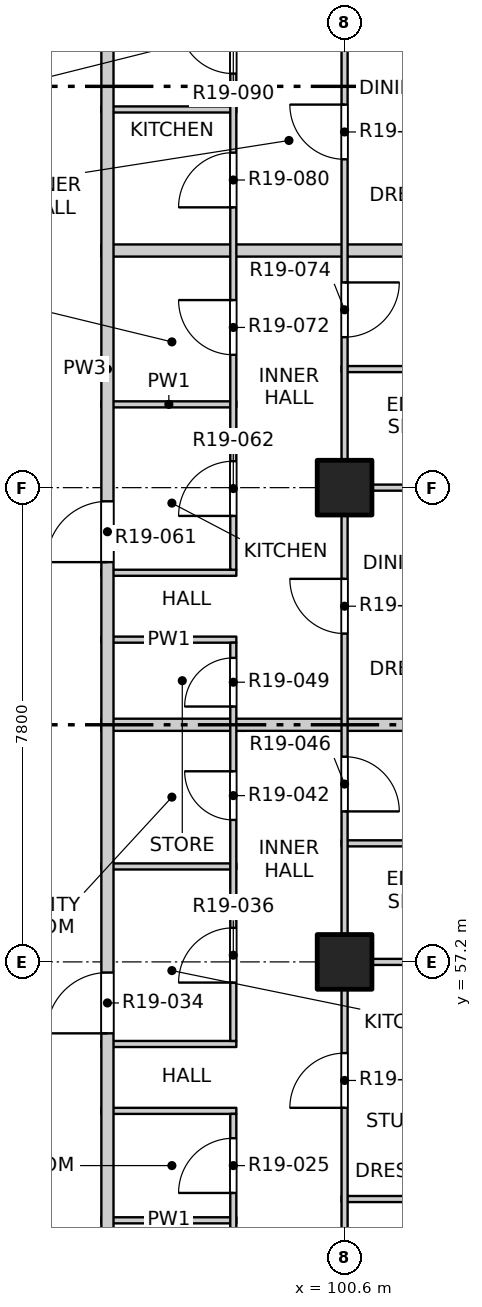
"""IFC4 building model, lengths in metres.
Left out: names, types, materials, properties, quantities, classifications, styles, units other than length and angle.
Written with IfcOpenShell. Run it as: python <this file> out.ifc"""

import sys

from ifc_helpers import new_model, si_unit, direction, frame, frame_2d, origin, origin_2d, place, context, subcontext, project, spatial, rectangle, extrude, element, fill, save


model = new_model("IFC4")
c1 = context("Model", 3, precision=1e-05, world=origin(), true_north=direction((0.0, 1.0)))
c2 = subcontext(c1, "Body", "Model", "MODEL_VIEW")
j1 = project(units=[si_unit("LENGTHUNIT", "METRE"), si_unit("PLANEANGLEUNIT", "RADIAN")], contexts=[c1])
p1 = place(None, origin())
s1 = spatial("IfcSite", under=j1, at=p1, CompositionType="ELEMENT")
p2 = place(p1, origin())
s2 = spatial("IfcBuilding", under=s1, at=p2, CompositionType="ELEMENT")
p3 = place(p2, frame((0.0, 0.0, 197.3)))
s3 = spatial("IfcBuildingStorey", under=s2, at=p3, CompositionType="ELEMENT", Elevation=197.3)
for number, where, z_axis, x_axis in (
    (1, (100.6, 57.2, -0.3), (0.0, 0.0, 1.0), (1.0, 0.0, 0.0)),
    (2, (100.6, 65.0, -0.3), (0.0, 0.0, 1.0), (1.0, 0.0, 0.0)),
):
    element("IfcColumn", number, at=place(p3, frame(where, z_axis=z_axis, x_axis=x_axis)), inside=s3, PredefinedType="COLUMN", context=c2, shape_type="SweptSolid", body=[
        extrude(rectangle(XDim=0.9, YDim=0.9, at=origin_2d()), origin(), (0.0, 0.0, 1.0), 3.45),
    ])
p4 = place(p3, frame((96.6, 52.95, 0.0), z_axis=(0.0, 0.0, 1.0), x_axis=(1.0, 0.0, 0.0)))
e3 = element("IfcWall", 3, at=p4, inside=s3, PredefinedType="PARTITIONING", context=c2, shape_type="SweptSolid", body=[
    extrude(rectangle(XDim=2.22, YDim=0.1, at=frame_2d((1.11, 0.0))), origin(), (0.0, 0.0, 1.0), 3.15),
])
p5 = place(p3, frame((100.55, 53.3, 0.0), z_axis=(0.0, 0.0, 1.0), x_axis=(1.0, 0.0, 0.0)))
e4 = element("IfcWall", 4, at=p5, inside=s3, PredefinedType="PARTITIONING", context=c2, shape_type="SweptSolid", body=[
    extrude(rectangle(XDim=7.55, YDim=0.1, at=frame_2d((3.775, 0.0))), origin(), (0.0, 0.0, 1.0), 3.15),
])
for number, where, z_axis, x_axis in (
    (5, (96.6, 54.75, 0.0), (0.0, 0.0, 1.0), (1.0, 0.0, 0.0)),
    (6, (96.6, 55.85, 0.0), (0.0, 0.0, 1.0), (1.0, 0.0, 0.0)),
):
    element("IfcWall", number, at=place(p3, frame(where, z_axis=z_axis, x_axis=x_axis)), inside=s3, PredefinedType="PARTITIONING", context=c2, shape_type="SweptSolid", body=[
        extrude(rectangle(XDim=2.22, YDim=0.1, at=frame_2d((1.11, 0.0))), origin(), (0.0, 0.0, 1.0), 3.15),
    ])
p6 = place(p3, frame((100.55, 57.2, 0.0), z_axis=(0.0, 0.0, 1.0), x_axis=(1.0, 0.0, 0.0)))
e7 = element("IfcWall", 7, at=p6, inside=s3, PredefinedType="PARTITIONING", context=c2, shape_type="SweptSolid", body=[
    extrude(rectangle(XDim=7.55, YDim=0.1, at=frame_2d((3.775, 0.0))), origin(), (0.0, 0.0, 1.0), 3.15),
])
p7 = place(p3, frame((96.6, 58.77, 0.0), z_axis=(0.0, 0.0, 1.0), x_axis=(1.0, 0.0, 0.0)))
e8 = element("IfcWall", 8, at=p7, inside=s3, PredefinedType="PARTITIONING", context=c2, shape_type="SweptSolid", body=[
    extrude(rectangle(XDim=2.22, YDim=0.1, at=frame_2d((1.11, 0.0))), origin(), (0.0, 0.0, 1.0), 3.15),
])
p8 = place(p3, frame((100.55, 59.15, 0.0), z_axis=(0.0, 0.0, 1.0), x_axis=(1.0, 0.0, 0.0)))
e9 = element("IfcWall", 9, at=p8, inside=s3, PredefinedType="PARTITIONING", context=c2, shape_type="SweptSolid", body=[
    extrude(rectangle(XDim=3.55, YDim=0.1, at=frame_2d((1.775, 0.0))), origin(), (0.0, 0.0, 1.0), 3.15),
])
p9 = place(p3, frame((96.6, 61.1, 0.0), z_axis=(0.0, 0.0, 1.0), x_axis=(1.0, 0.0, 0.0)))
e10 = element("IfcWall", 10, at=p9, inside=s3, PredefinedType="PARTITIONING", context=c2, shape_type="SweptSolid", body=[
    extrude(rectangle(XDim=11.5, YDim=0.2, at=frame_2d((5.75, 0.0))), origin(), (0.0, 0.0, 1.0), 2.55),
])
for number, where, z_axis, x_axis in (
    (11, (96.6, 62.5, 0.0), (0.0, 0.0, 1.0), (1.0, 0.0, 0.0)),
    (12, (96.6, 63.6, 0.0), (0.0, 0.0, 1.0), (1.0, 0.0, 0.0)),
):
    element("IfcWall", number, at=place(p3, frame(where, z_axis=z_axis, x_axis=x_axis)), inside=s3, PredefinedType="PARTITIONING", context=c2, shape_type="SweptSolid", body=[
        extrude(rectangle(XDim=2.22, YDim=0.1, at=frame_2d((1.11, 0.0))), origin(), (0.0, 0.0, 1.0), 3.15),
    ])
p10 = place(p3, frame((100.55, 65.0, 0.0), z_axis=(0.0, 0.0, 1.0), x_axis=(1.0, 0.0, 0.0)))
e13 = element("IfcWall", 13, at=p10, inside=s3, PredefinedType="PARTITIONING", context=c2, shape_type="SweptSolid", body=[
    extrude(rectangle(XDim=7.55, YDim=0.1, at=frame_2d((3.775, 0.0))), origin(), (0.0, 0.0, 1.0), 3.15),
])
p11 = place(p3, frame((96.6, 66.37, 0.0), z_axis=(0.0, 0.0, 1.0), x_axis=(1.0, 0.0, 0.0)))
e14 = element("IfcWall", 14, at=p11, inside=s3, PredefinedType="PARTITIONING", context=c2, shape_type="SweptSolid", body=[
    extrude(rectangle(XDim=2.22, YDim=0.1, at=frame_2d((1.11, 0.0))), origin(), (0.0, 0.0, 1.0), 3.15),
])
p12 = place(p3, frame((100.55, 66.95, 0.0), z_axis=(0.0, 0.0, 1.0), x_axis=(1.0, 0.0, 0.0)))
e15 = element("IfcWall", 15, at=p12, inside=s3, PredefinedType="PARTITIONING", context=c2, shape_type="SweptSolid", body=[
    extrude(rectangle(XDim=3.55, YDim=0.1, at=frame_2d((1.775, 0.0))), origin(), (0.0, 0.0, 1.0), 3.15),
])
p13 = place(p3, frame((96.6, 68.9, 0.0), z_axis=(0.0, 0.0, 1.0), x_axis=(1.0, 0.0, 0.0)))
e16 = element("IfcWall", 16, at=p13, inside=s3, PredefinedType="PARTITIONING", context=c2, shape_type="SweptSolid", body=[
    extrude(rectangle(XDim=11.5, YDim=0.2, at=frame_2d((5.75, 0.0))), origin(), (0.0, 0.0, 1.0), 2.55),
])
p14 = place(p3, frame((96.6, 71.22, 0.0), z_axis=(0.0, 0.0, 1.0), x_axis=(1.0, 0.0, 0.0)))
e17 = element("IfcWall", 17, at=p14, inside=s3, PredefinedType="PARTITIONING", context=c2, shape_type="SweptSolid", body=[
    extrude(rectangle(XDim=2.22, YDim=0.1, at=frame_2d((1.11, 0.0))), origin(), (0.0, 0.0, 1.0), 3.15),
])
p15 = place(p3, frame((96.7, 49.5, 0.0), z_axis=(0.0, 0.0, 1.0), x_axis=(0.0, 1.0, 0.0)))
e18 = element("IfcWall", 18, at=p15, inside=s3, PredefinedType="PARTITIONING", context=c2, shape_type="SweptSolid", body=[
    extrude(rectangle(XDim=34.9, YDim=0.2, at=frame_2d((17.45, 0.0))), origin(), (0.0, 0.0, 1.0), 3.15),
])
p16 = place(p15, frame((6.525, 0.0, 0.0)))
e19 = element("IfcOpeningElement", 19, at=p16, cuts=e18, PredefinedType="OPENING", context=c2, shape_type="SweptSolid", body=[
    extrude(rectangle(XDim=1.0, YDim=2.1, at=frame_2d((0.5, 1.05))), frame((0.0, 0.11, 0.0), z_axis=(0.0, -1.0, 0.0), x_axis=(1.0, 0.0, 0.0)), (0.0, 0.0, 1.0), 0.22),
])
p17 = place(p15, frame((14.275, 0.0, 0.0)))
e20 = element("IfcOpeningElement", 20, at=p17, cuts=e18, PredefinedType="OPENING", context=c2, shape_type="SweptSolid", body=[
    extrude(rectangle(XDim=1.0, YDim=2.1, at=frame_2d((0.5, 1.05))), frame((0.0, 0.11, 0.0), z_axis=(0.0, -1.0, 0.0), x_axis=(1.0, 0.0, 0.0)), (0.0, 0.0, 1.0), 0.22),
])
p18 = place(p15, frame((25.075, 0.0, 0.0)))
e21 = element("IfcOpeningElement", 21, at=p18, cuts=e18, PredefinedType="OPENING", context=c2, shape_type="SweptSolid", body=[
    extrude(rectangle(XDim=1.0, YDim=2.1, at=frame_2d((0.5, 1.05))), frame((0.0, 0.11, 0.0), z_axis=(0.0, -1.0, 0.0), x_axis=(1.0, 0.0, 0.0)), (0.0, 0.0, 1.0), 0.22),
])
p19 = place(p15, frame((30.475, 0.0, 0.0)))
e22 = element("IfcOpeningElement", 22, at=p19, cuts=e18, PredefinedType="OPENING", context=c2, shape_type="SweptSolid", body=[
    extrude(rectangle(XDim=1.0, YDim=2.1, at=frame_2d((0.5, 1.05))), frame((0.0, 0.11, 0.0), z_axis=(0.0, -1.0, 0.0), x_axis=(1.0, 0.0, 0.0)), (0.0, 0.0, 1.0), 0.22),
])
p20 = place(p3, frame((98.77, 45.55, 0.0), z_axis=(0.0, 0.0, 1.0), x_axis=(0.0, 1.0, 0.0)))
e23 = element("IfcWall", 23, at=p20, inside=s3, PredefinedType="PARTITIONING", context=c2, shape_type="SweptSolid", body=[
    extrude(rectangle(XDim=9.15, YDim=0.1, at=frame_2d((4.575, 0.0))), origin(), (0.0, 0.0, 1.0), 3.15),
])
p21 = place(p20, frame((0.85, 0.0, 0.0)))
e24 = element("IfcOpeningElement", 24, at=p21, cuts=e23, PredefinedType="OPENING", context=c2, shape_type="SweptSolid", body=[
    extrude(rectangle(XDim=0.8, YDim=2.1, at=frame_2d((0.4, 1.05))), frame((0.0, 0.06, 0.0), z_axis=(0.0, -1.0, 0.0), x_axis=(1.0, 0.0, 0.0)), (0.0, 0.0, 1.0), 0.12),
])
p22 = place(p20, frame((3.375, 0.0, 0.0)))
e25 = element("IfcOpeningElement", 25, at=p22, cuts=e23, PredefinedType="OPENING", context=c2, shape_type="SweptSolid", body=[
    extrude(rectangle(XDim=0.8, YDim=2.1, at=frame_2d((0.4, 1.05))), frame((0.0, 0.06, 0.0), z_axis=(0.0, -1.0, 0.0), x_axis=(1.0, 0.0, 0.0)), (0.0, 0.0, 1.0), 0.12),
])
p23 = place(p20, frame((5.75, 0.0, 0.0)))
e26 = element("IfcOpeningElement", 26, at=p23, cuts=e23, PredefinedType="OPENING", context=c2, shape_type="SweptSolid", body=[
    extrude(rectangle(XDim=0.9, YDim=2.1, at=frame_2d((0.45, 1.05))), frame((0.0, 0.06, 0.0), z_axis=(0.0, -1.0, 0.0), x_axis=(1.0, 0.0, 0.0)), (0.0, 0.0, 1.0), 0.12),
])
p24 = place(p20, frame((7.85, 0.0, 0.0)))
e27 = element("IfcOpeningElement", 27, at=p24, cuts=e23, PredefinedType="OPENING", context=c2, shape_type="SweptSolid", body=[
    extrude(rectangle(XDim=0.9, YDim=2.1, at=frame_2d((0.45, 1.05))), frame((0.0, 0.06, 0.0), z_axis=(0.0, -1.0, 0.0), x_axis=(1.0, 0.0, 0.0)), (0.0, 0.0, 1.0), 0.12),
])
p25 = place(p3, frame((98.77, 55.9, 0.0), z_axis=(0.0, 0.0, 1.0), x_axis=(0.0, 1.0, 0.0)))
e28 = element("IfcWall", 28, at=p25, inside=s3, PredefinedType="PARTITIONING", context=c2, shape_type="SweptSolid", body=[
    extrude(rectangle(XDim=6.55, YDim=0.1, at=frame_2d((3.275, 0.0))), origin(), (0.0, 0.0, 1.0), 3.15),
])
p26 = place(p25, frame((0.96, 0.0, 0.0)))
e29 = element("IfcOpeningElement", 29, at=p26, cuts=e28, PredefinedType="OPENING", context=c2, shape_type="SweptSolid", body=[
    extrude(rectangle(XDim=0.9, YDim=2.1, at=frame_2d((0.45, 1.05))), frame((0.0, 0.06, 0.0), z_axis=(0.0, -1.0, 0.0), x_axis=(1.0, 0.0, 0.0)), (0.0, 0.0, 1.0), 0.12),
])
p27 = place(p25, frame((3.635, 0.0, 0.0)))
e30 = element("IfcOpeningElement", 30, at=p27, cuts=e28, PredefinedType="OPENING", context=c2, shape_type="SweptSolid", body=[
    extrude(rectangle(XDim=0.8, YDim=2.1, at=frame_2d((0.4, 1.05))), frame((0.0, 0.06, 0.0), z_axis=(0.0, -1.0, 0.0), x_axis=(1.0, 0.0, 0.0)), (0.0, 0.0, 1.0), 0.12),
])
p28 = place(p25, frame((5.5, 0.0, 0.0)))
e31 = element("IfcOpeningElement", 31, at=p28, cuts=e28, PredefinedType="OPENING", context=c2, shape_type="SweptSolid", body=[
    extrude(rectangle(XDim=0.8, YDim=2.1, at=frame_2d((0.4, 1.05))), frame((0.0, 0.06, 0.0), z_axis=(0.0, -1.0, 0.0), x_axis=(1.0, 0.0, 0.0)), (0.0, 0.0, 1.0), 0.12),
])
p29 = place(p3, frame((98.77, 63.65, 0.0), z_axis=(0.0, 0.0, 1.0), x_axis=(0.0, 1.0, 0.0)))
e32 = element("IfcWall", 32, at=p29, inside=s3, PredefinedType="PARTITIONING", context=c2, shape_type="SweptSolid", body=[
    extrude(rectangle(XDim=9.6, YDim=0.1, at=frame_2d((4.8, 0.0))), origin(), (0.0, 0.0, 1.0), 3.15),
])
p30 = place(p29, frame((0.885, 0.0, 0.0)))
e33 = element("IfcOpeningElement", 33, at=p30, cuts=e32, PredefinedType="OPENING", context=c2, shape_type="SweptSolid", body=[
    extrude(rectangle(XDim=0.9, YDim=2.1, at=frame_2d((0.45, 1.05))), frame((0.0, 0.06, 0.0), z_axis=(0.0, -1.0, 0.0), x_axis=(1.0, 0.0, 0.0)), (0.0, 0.0, 1.0), 0.12),
])
p31 = place(p29, frame((3.535, 0.0, 0.0)))
e34 = element("IfcOpeningElement", 34, at=p31, cuts=e32, PredefinedType="OPENING", context=c2, shape_type="SweptSolid", body=[
    extrude(rectangle(XDim=0.9, YDim=2.1, at=frame_2d((0.45, 1.05))), frame((0.0, 0.06, 0.0), z_axis=(0.0, -1.0, 0.0), x_axis=(1.0, 0.0, 0.0)), (0.0, 0.0, 1.0), 0.12),
])
p32 = place(p29, frame((5.96, 0.0, 0.0)))
e35 = element("IfcOpeningElement", 35, at=p32, cuts=e32, PredefinedType="OPENING", context=c2, shape_type="SweptSolid", body=[
    extrude(rectangle(XDim=0.9, YDim=2.1, at=frame_2d((0.45, 1.05))), frame((0.0, 0.06, 0.0), z_axis=(0.0, -1.0, 0.0), x_axis=(1.0, 0.0, 0.0)), (0.0, 0.0, 1.0), 0.12),
])
p33 = place(p29, frame((8.16, 0.0, 0.0)))
e36 = element("IfcOpeningElement", 36, at=p33, cuts=e32, PredefinedType="OPENING", context=c2, shape_type="SweptSolid", body=[
    extrude(rectangle(XDim=0.9, YDim=2.1, at=frame_2d((0.45, 1.05))), frame((0.0, 0.06, 0.0), z_axis=(0.0, -1.0, 0.0), x_axis=(1.0, 0.0, 0.0)), (0.0, 0.0, 1.0), 0.12),
])
p34 = place(p3, frame((100.6, 41.9, 0.0), z_axis=(0.0, 0.0, 1.0), x_axis=(0.0, 1.0, 0.0)))
e37 = element("IfcWall", 37, at=p34, inside=s3, PredefinedType="PARTITIONING", context=c2, shape_type="SweptSolid", body=[
    extrude(rectangle(XDim=46.2, YDim=0.1, at=frame_2d((23.1, 0.0))), origin(), (0.0, 0.0, 1.0), 3.15),
])
p35 = place(p34, frame((1.2, 0.0, 0.0)))
e38 = element("IfcOpeningElement", 38, at=p35, cuts=e37, PredefinedType="OPENING", context=c2, shape_type="SweptSolid", body=[
    extrude(rectangle(XDim=0.9, YDim=2.1, at=frame_2d((0.45, 1.05))), frame((0.0, 0.06, 0.0), z_axis=(0.0, -1.0, 0.0), x_axis=(1.0, 0.0, 0.0)), (0.0, 0.0, 1.0), 0.12),
])
p36 = place(p34, frame((5.1, 0.0, 0.0)))
e39 = element("IfcOpeningElement", 39, at=p36, cuts=e37, PredefinedType="OPENING", context=c2, shape_type="SweptSolid", body=[
    extrude(rectangle(XDim=0.9, YDim=2.1, at=frame_2d((0.45, 1.05))), frame((0.0, 0.06, 0.0), z_axis=(0.0, -1.0, 0.0), x_axis=(1.0, 0.0, 0.0)), (0.0, 0.0, 1.0), 0.12),
])
p37 = place(p34, frame((9.975, 0.0, 0.0)))
e40 = element("IfcOpeningElement", 40, at=p37, cuts=e37, PredefinedType="OPENING", context=c2, shape_type="SweptSolid", body=[
    extrude(rectangle(XDim=0.9, YDim=2.1, at=frame_2d((0.45, 1.05))), frame((0.0, 0.06, 0.0), z_axis=(0.0, -1.0, 0.0), x_axis=(1.0, 0.0, 0.0)), (0.0, 0.0, 1.0), 0.12),
])
p38 = place(p34, frame((12.9, 0.0, 0.0)))
e41 = element("IfcOpeningElement", 41, at=p38, cuts=e37, PredefinedType="OPENING", context=c2, shape_type="SweptSolid", body=[
    extrude(rectangle(XDim=0.9, YDim=2.1, at=frame_2d((0.45, 1.05))), frame((0.0, 0.06, 0.0), z_axis=(0.0, -1.0, 0.0), x_axis=(1.0, 0.0, 0.0)), (0.0, 0.0, 1.0), 0.12),
])
p39 = place(p34, frame((17.775, 0.0, 0.0)))
e42 = element("IfcOpeningElement", 42, at=p39, cuts=e37, PredefinedType="OPENING", context=c2, shape_type="SweptSolid", body=[
    extrude(rectangle(XDim=0.9, YDim=2.1, at=frame_2d((0.45, 1.05))), frame((0.0, 0.06, 0.0), z_axis=(0.0, -1.0, 0.0), x_axis=(1.0, 0.0, 0.0)), (0.0, 0.0, 1.0), 0.12),
])
p40 = place(p34, frame((20.7, 0.0, 0.0)))
e43 = element("IfcOpeningElement", 43, at=p40, cuts=e37, PredefinedType="OPENING", context=c2, shape_type="SweptSolid", body=[
    extrude(rectangle(XDim=0.9, YDim=2.1, at=frame_2d((0.45, 1.05))), frame((0.0, 0.06, 0.0), z_axis=(0.0, -1.0, 0.0), x_axis=(1.0, 0.0, 0.0)), (0.0, 0.0, 1.0), 0.12),
])
p41 = place(p34, frame((25.575, 0.0, 0.0)))
e44 = element("IfcOpeningElement", 44, at=p41, cuts=e37, PredefinedType="OPENING", context=c2, shape_type="SweptSolid", body=[
    extrude(rectangle(XDim=0.9, YDim=2.1, at=frame_2d((0.45, 1.05))), frame((0.0, 0.06, 0.0), z_axis=(0.0, -1.0, 0.0), x_axis=(1.0, 0.0, 0.0)), (0.0, 0.0, 1.0), 0.12),
])
p42 = place(p34, frame((28.5, 0.0, 0.0)))
e45 = element("IfcOpeningElement", 45, at=p42, cuts=e37, PredefinedType="OPENING", context=c2, shape_type="SweptSolid", body=[
    extrude(rectangle(XDim=0.9, YDim=2.1, at=frame_2d((0.45, 1.05))), frame((0.0, 0.06, 0.0), z_axis=(0.0, -1.0, 0.0), x_axis=(1.0, 0.0, 0.0)), (0.0, 0.0, 1.0), 0.12),
])
p43 = place(p34, frame((33.375, 0.0, 0.0)))
e46 = element("IfcOpeningElement", 46, at=p43, cuts=e37, PredefinedType="OPENING", context=c2, shape_type="SweptSolid", body=[
    extrude(rectangle(XDim=0.9, YDim=2.1, at=frame_2d((0.45, 1.05))), frame((0.0, 0.06, 0.0), z_axis=(0.0, -1.0, 0.0), x_axis=(1.0, 0.0, 0.0)), (0.0, 0.0, 1.0), 0.12),
])
p44 = place(p34, frame((37.225, 0.0, 0.0)))
e47 = element("IfcOpeningElement", 47, at=p44, cuts=e37, PredefinedType="OPENING", context=c2, shape_type="SweptSolid", body=[
    extrude(rectangle(XDim=0.9, YDim=2.1, at=frame_2d((0.45, 1.05))), frame((0.0, 0.06, 0.0), z_axis=(0.0, -1.0, 0.0), x_axis=(1.0, 0.0, 0.0)), (0.0, 0.0, 1.0), 0.12),
])
p45 = place(p34, frame((41.175, 0.0, 0.0)))
e48 = element("IfcOpeningElement", 48, at=p45, cuts=e37, PredefinedType="OPENING", context=c2, shape_type="SweptSolid", body=[
    extrude(rectangle(XDim=0.9, YDim=2.1, at=frame_2d((0.45, 1.05))), frame((0.0, 0.06, 0.0), z_axis=(0.0, -1.0, 0.0), x_axis=(1.0, 0.0, 0.0)), (0.0, 0.0, 1.0), 0.12),
])
p46 = place(p34, frame((44.1, 0.0, 0.0)))
e49 = element("IfcOpeningElement", 49, at=p46, cuts=e37, PredefinedType="OPENING", context=c2, shape_type="SweptSolid", body=[
    extrude(rectangle(XDim=0.9, YDim=2.1, at=frame_2d((0.45, 1.05))), frame((0.0, 0.06, 0.0), z_axis=(0.0, -1.0, 0.0), x_axis=(1.0, 0.0, 0.0)), (0.0, 0.0, 1.0), 0.12),
])
p47 = place(p24, origin())
e50 = element("IfcDoor", 50, at=p47, inside=s3, OperationType="SINGLE_SWING_LEFT", PredefinedType="DOOR", context=c2, shape_type="SweptSolid", body=[
    extrude(rectangle(XDim=0.9, YDim=2.1, at=frame_2d((0.45, 1.05))), frame((0.0, 0.025, 0.0), z_axis=(0.0, -1.0, 0.0), x_axis=(1.0, 0.0, 0.0)), (0.0, 0.0, 1.0), 0.05),
])
fill(e27, e50)
p48 = place(p38, origin())
e51 = element("IfcDoor", 51, at=p48, inside=s3, OperationType="SINGLE_SWING_LEFT", PredefinedType="DOOR", context=c2, shape_type="SweptSolid", body=[
    extrude(rectangle(XDim=0.9, YDim=2.1, at=frame_2d((0.45, 1.05))), frame((0.0, 0.025, 0.0), z_axis=(0.0, -1.0, 0.0), x_axis=(1.0, 0.0, 0.0)), (0.0, 0.0, 1.0), 0.05),
])
fill(e41, e51)
p49 = place(p16, origin())
e52 = element("IfcDoor", 52, at=p49, inside=s3, OperationType="SINGLE_SWING_LEFT", PredefinedType="DOOR", context=c2, shape_type="SweptSolid", body=[
    extrude(rectangle(XDim=1.0, YDim=2.1, at=frame_2d((0.5, 1.05))), frame((0.0, 0.025, 0.0), z_axis=(0.0, -1.0, 0.0), x_axis=(1.0, 0.0, 0.0)), (0.0, 0.0, 1.0), 0.05),
])
fill(e19, e52)
p50 = place(p26, origin())
e53 = element("IfcDoor", 53, at=p50, inside=s3, OperationType="SINGLE_SWING_LEFT", PredefinedType="DOOR", context=c2, shape_type="SweptSolid", body=[
    extrude(rectangle(XDim=0.9, YDim=2.1, at=frame_2d((0.45, 1.05))), frame((0.0, 0.025, 0.0), z_axis=(0.0, -1.0, 0.0), x_axis=(1.0, 0.0, 0.0)), (0.0, 0.0, 1.0), 0.05),
])
fill(e29, e53)
p51 = place(p27, origin())
e54 = element("IfcDoor", 54, at=p51, inside=s3, OperationType="SINGLE_SWING_RIGHT", PredefinedType="DOOR", context=c2, shape_type="SweptSolid", body=[
    extrude(rectangle(XDim=0.8, YDim=2.1, at=frame_2d((0.4, 1.05))), frame((0.0, 0.025, 0.0), z_axis=(0.0, -1.0, 0.0), x_axis=(1.0, 0.0, 0.0)), (0.0, 0.0, 1.0), 0.05),
])
fill(e30, e54)
p52 = place(p39, origin())
e55 = element("IfcDoor", 55, at=p52, inside=s3, OperationType="SINGLE_SWING_RIGHT", PredefinedType="DOOR", context=c2, shape_type="SweptSolid", body=[
    extrude(rectangle(XDim=0.9, YDim=2.1, at=frame_2d((0.45, 1.05))), frame((0.0, 0.025, 0.0), z_axis=(0.0, -1.0, 0.0), x_axis=(1.0, 0.0, 0.0)), (0.0, 0.0, 1.0), 0.05),
])
fill(e42, e55)
p53 = place(p28, origin())
e56 = element("IfcDoor", 56, at=p53, inside=s3, OperationType="SINGLE_SWING_LEFT", PredefinedType="DOOR", context=c2, shape_type="SweptSolid", body=[
    extrude(rectangle(XDim=0.8, YDim=2.1, at=frame_2d((0.4, 1.05))), frame((0.0, 0.025, 0.0), z_axis=(0.0, -1.0, 0.0), x_axis=(1.0, 0.0, 0.0)), (0.0, 0.0, 1.0), 0.05),
])
fill(e31, e56)
p54 = place(p40, origin())
e57 = element("IfcDoor", 57, at=p54, inside=s3, OperationType="SINGLE_SWING_RIGHT", PredefinedType="DOOR", context=c2, shape_type="SweptSolid", body=[
    extrude(rectangle(XDim=0.9, YDim=2.1, at=frame_2d((0.45, 1.05))), frame((0.0, 0.025, 0.0), z_axis=(0.0, -1.0, 0.0), x_axis=(1.0, 0.0, 0.0)), (0.0, 0.0, 1.0), 0.05),
])
fill(e43, e57)
p55 = place(p17, origin())
e58 = element("IfcDoor", 58, at=p55, inside=s3, OperationType="SINGLE_SWING_LEFT", PredefinedType="DOOR", context=c2, shape_type="SweptSolid", body=[
    extrude(rectangle(XDim=1.0, YDim=2.1, at=frame_2d((0.5, 1.05))), frame((0.0, 0.025, 0.0), z_axis=(0.0, -1.0, 0.0), x_axis=(1.0, 0.0, 0.0)), (0.0, 0.0, 1.0), 0.05),
])
fill(e20, e58)
p56 = place(p30, origin())
e59 = element("IfcDoor", 59, at=p56, inside=s3, OperationType="SINGLE_SWING_LEFT", PredefinedType="DOOR", context=c2, shape_type="SweptSolid", body=[
    extrude(rectangle(XDim=0.9, YDim=2.1, at=frame_2d((0.45, 1.05))), frame((0.0, 0.025, 0.0), z_axis=(0.0, -1.0, 0.0), x_axis=(1.0, 0.0, 0.0)), (0.0, 0.0, 1.0), 0.05),
])
fill(e33, e59)
p57 = place(p31, origin())
e60 = element("IfcDoor", 60, at=p57, inside=s3, OperationType="SINGLE_SWING_RIGHT", PredefinedType="DOOR", context=c2, shape_type="SweptSolid", body=[
    extrude(rectangle(XDim=0.9, YDim=2.1, at=frame_2d((0.45, 1.05))), frame((0.0, 0.025, 0.0), z_axis=(0.0, -1.0, 0.0), x_axis=(1.0, 0.0, 0.0)), (0.0, 0.0, 1.0), 0.05),
])
fill(e34, e60)
p58 = place(p41, origin())
e61 = element("IfcDoor", 61, at=p58, inside=s3, OperationType="SINGLE_SWING_LEFT", PredefinedType="DOOR", context=c2, shape_type="SweptSolid", body=[
    extrude(rectangle(XDim=0.9, YDim=2.1, at=frame_2d((0.45, 1.05))), frame((0.0, 0.025, 0.0), z_axis=(0.0, -1.0, 0.0), x_axis=(1.0, 0.0, 0.0)), (0.0, 0.0, 1.0), 0.05),
])
fill(e44, e61)
p59 = place(p32, origin())
e62 = element("IfcDoor", 62, at=p59, inside=s3, OperationType="SINGLE_SWING_LEFT", PredefinedType="DOOR", context=c2, shape_type="SweptSolid", body=[
    extrude(rectangle(XDim=0.9, YDim=2.1, at=frame_2d((0.45, 1.05))), frame((0.0, 0.025, 0.0), z_axis=(0.0, -1.0, 0.0), x_axis=(1.0, 0.0, 0.0)), (0.0, 0.0, 1.0), 0.05),
])
fill(e35, e62)
p60 = place(p42, origin())
e63 = element("IfcDoor", 63, at=p60, inside=s3, OperationType="SINGLE_SWING_RIGHT", PredefinedType="DOOR", context=c2, shape_type="SweptSolid", body=[
    extrude(rectangle(XDim=0.9, YDim=2.1, at=frame_2d((0.45, 1.05))), frame((0.0, 0.025, 0.0), z_axis=(0.0, -1.0, 0.0), x_axis=(1.0, 0.0, 0.0)), (0.0, 0.0, 1.0), 0.05),
])
fill(e45, e63)
p61 = place(p33, origin())
e64 = element("IfcDoor", 64, at=p61, inside=s3, OperationType="SINGLE_SWING_RIGHT", PredefinedType="DOOR", context=c2, shape_type="SweptSolid", body=[
    extrude(rectangle(XDim=0.9, YDim=2.1, at=frame_2d((0.45, 1.05))), frame((0.0, 0.025, 0.0), z_axis=(0.0, -1.0, 0.0), x_axis=(1.0, 0.0, 0.0)), (0.0, 0.0, 1.0), 0.05),
])
fill(e36, e64)
save(model, sys.argv[1])
